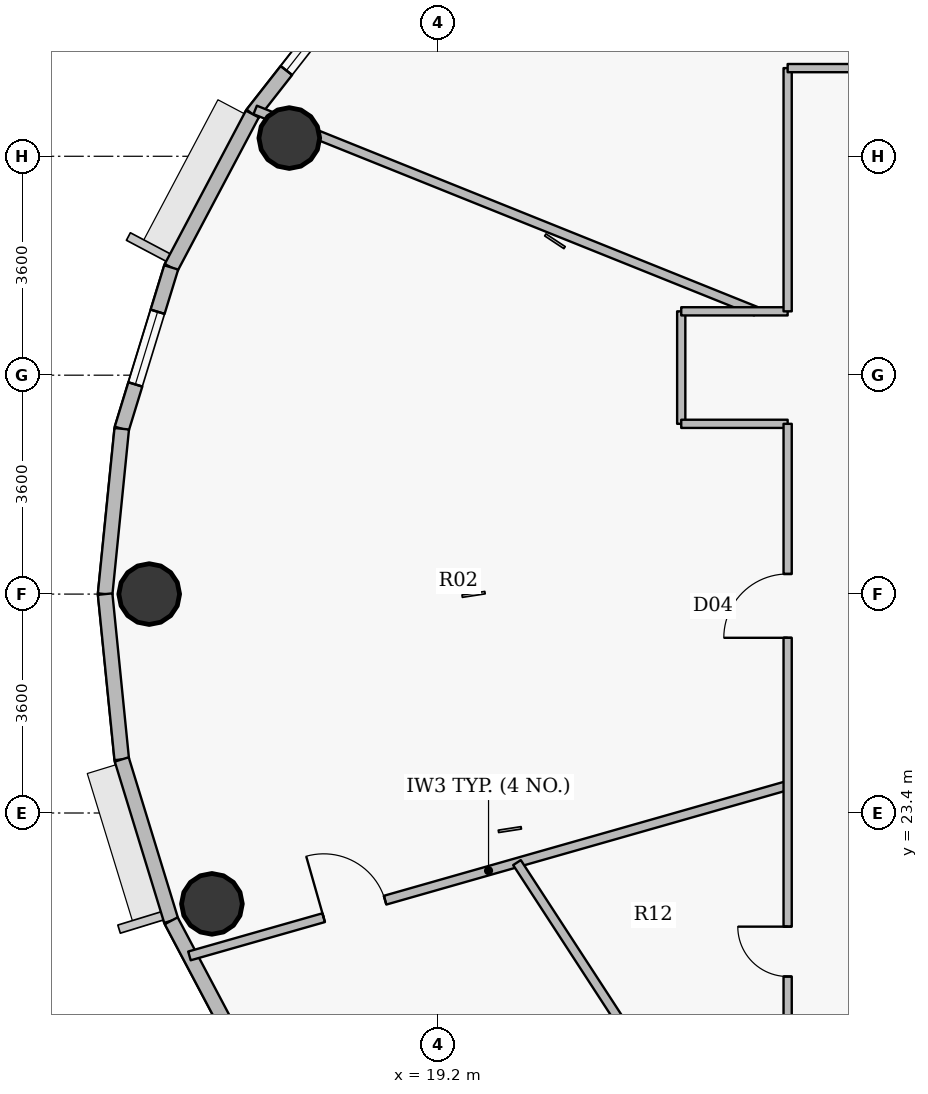
"""IFC4 building model, lengths in metres.
Left out: names, types, materials, properties, quantities, classifications, styles, units other than length and angle.
Written with IfcOpenShell. Run it as: python <this file> out.ifc"""

import sys

from ifc_helpers import new_model, si_unit, direction, frame, frame_2d, origin, origin_2d, place, context, subcontext, project, spatial, rectangle, hollow_circle, extrude, source, transform, mapped, element, fill, save


model = new_model("IFC4")
c1 = context("Model", 3, precision=1e-05, world=origin(), true_north=direction((0.0, 1.0)))
c2 = subcontext(c1, "Body", "Model", "MODEL_VIEW")
j1 = project(units=[si_unit("LENGTHUNIT", "METRE"), si_unit("PLANEANGLEUNIT", "RADIAN")], contexts=[c1])
p1 = place(None, origin())
s1 = spatial("IfcSite", under=j1, at=p1, CompositionType="ELEMENT")
p2 = place(p1, origin())
s2 = spatial("IfcBuilding", under=s1, at=p2, CompositionType="ELEMENT")
p3 = place(p2, frame((0.0, 0.0, 310.5)))
s3 = spatial("IfcBuildingStorey", under=s2, at=p3, CompositionType="ELEMENT", Elevation=310.5)
for number, where, z_axis, x_axis in (
    (1, (16.754, 34.5, 0.0), (0.0, 0.0, 1.0), (1.0, 0.0, 0.0)),
    (2, (14.45, 27.0, 0.0), (0.0, 0.0, 1.0), (1.0, 0.0, 0.0)),
    (3, (15.481, 21.906, 0.0), (0.0, 0.0, 1.0), (1.0, 0.0, 0.0)),
):
    element("IfcColumn", number, at=place(p3, frame(where, z_axis=z_axis, x_axis=x_axis)), inside=s3, PredefinedType="COLUMN", context=c2, shape_type="SweptSolid", body=[
        extrude(hollow_circle(Radius=0.5, WallThickness=0.032, at=origin_2d()), origin(), (0.0, 0.0, 1.0), 3.75),
    ])
p4 = place(p3, frame((16.146, 34.895, 0.0), z_axis=(0.0, 0.0, 1.0), x_axis=(0.616337186556, 0.787482363275, 0.0)))
e4 = element("IfcWall", 4, at=p4, inside=s3, PredefinedType="SOLIDWALL", context=c2, shape_type="SweptSolid", body=[
    extrude(rectangle(XDim=2.958, YDim=0.24, at=frame_2d((1.479, 0.0))), origin(), (0.0, 0.0, 1.0), 3.5),
])
p5 = place(p4, frame((0.909, 0.0, 0.9)))
e5 = element("IfcOpeningElement", 5, at=p5, cuts=e4, PredefinedType="OPENING", context=c2, shape_type="SweptSolid", body=[
    extrude(rectangle(XDim=1.25, YDim=1.65, at=origin_2d()), frame((0.625, 0.13, 0.825), z_axis=(0.0, -1.0, 0.0), x_axis=(1.0, 0.0, 0.0)), (0.0, 0.0, 1.0), 0.26),
])
p6 = place(p3, frame((14.812, 32.372, 0.0), z_axis=(0.0, 0.0, 1.0), x_axis=(0.467628269026, 0.883925224218, 0.0)))
e6 = element("IfcWall", 6, at=p6, inside=s3, PredefinedType="SOLIDWALL", context=c2, shape_type="SweptSolid", body=[
    extrude(rectangle(XDim=2.854, YDim=0.24, at=frame_2d((1.427, 0.0))), origin(), (0.0, 0.0, 1.0), 3.5),
])
p7 = place(p3, frame((13.998, 29.719, 0.0), z_axis=(0.0, 0.0, 1.0), x_axis=(0.2931213403, 0.956075248012, 0.0)))
e7 = element("IfcWall", 7, at=p7, inside=s3, PredefinedType="SOLIDWALL", context=c2, shape_type="SweptSolid", body=[
    extrude(rectangle(XDim=2.775, YDim=0.24, at=frame_2d((1.388, 0.0))), origin(), (0.0, 0.0, 1.0), 3.5),
])
p8 = place(p7, frame((0.763, 0.0, 0.9)))
e8 = element("IfcOpeningElement", 8, at=p8, cuts=e7, PredefinedType="OPENING", context=c2, shape_type="SweptSolid", body=[
    extrude(rectangle(XDim=1.25, YDim=1.65, at=origin_2d()), frame((0.625, 0.13, 0.825), z_axis=(0.0, -1.0, 0.0), x_axis=(1.0, 0.0, 0.0)), (0.0, 0.0, 1.0), 0.26),
])
for number, where, z_axis, x_axis in (
    (9, (13.725, 27.0, 0.0), (0.0, 0.0, 1.0), (0.1, 0.995, 0.0)),
    (10, (13.998, 24.281, 0.0), (0.0, 0.0, 1.0), (-0.1, 0.995, 0.0)),
):
    element("IfcWall", number, at=place(p3, frame(where, z_axis=z_axis, x_axis=x_axis)), inside=s3, PredefinedType="SOLIDWALL", context=c2, shape_type="SweptSolid", body=[
        extrude(rectangle(XDim=2.733, YDim=0.24, at=frame_2d((1.366, 0.0))), origin(), (0.0, 0.0, 1.0), 3.5),
    ])
p9 = place(p3, frame((14.812, 21.628, 0.0), z_axis=(0.0, 0.0, 1.0), x_axis=(-0.2931213403, 0.956075248012, 0.0)))
e11 = element("IfcWall", 11, at=p9, inside=s3, PredefinedType="SOLIDWALL", context=c2, shape_type="SweptSolid", body=[
    extrude(rectangle(XDim=2.775, YDim=0.24, at=frame_2d((1.388, 0.0))), origin(), (0.0, 0.0, 1.0), 3.5),
])
p10 = place(p3, frame((16.146, 19.105, 0.0), z_axis=(0.0, 0.0, 1.0), x_axis=(-0.467628269026, 0.883925224218, 0.0)))
e12 = element("IfcWall", 12, at=p10, inside=s3, PredefinedType="SOLIDWALL", context=c2, shape_type="SweptSolid", body=[
    extrude(rectangle(XDim=2.854, YDim=0.24, at=frame_2d((1.427, 0.0))), origin(), (0.0, 0.0, 1.0), 3.5),
])
p11 = place(p3, frame((15.112, 21.05, 0.0), z_axis=(0.0, 0.0, 1.0), x_axis=(0.961740695875, 0.273961373004, 0.0)))
e13 = element("IfcWall", 13, at=p11, inside=s3, PredefinedType="PARTITIONING", context=c2, shape_type="SweptSolid", body=[
    extrude(rectangle(XDim=10.229, YDim=0.15, at=frame_2d((5.115, 0.0))), origin(), (0.0, 0.0, 1.0), 2.985),
])
p12 = place(p11, frame((2.295, 0.0, 0.0)))
e14 = element("IfcOpeningElement", 14, at=p12, cuts=e13, PredefinedType="OPENING", context=c2, shape_type="SweptSolid", body=[
    extrude(rectangle(XDim=1.05, YDim=2.15, at=origin_2d()), frame((0.525, 0.085, 1.075), z_axis=(0.0, -1.0, 0.0), x_axis=(1.0, 0.0, 0.0)), (0.0, 0.0, 1.0), 0.17),
])
p13 = place(p3, frame((16.193, 34.962, 0.0), z_axis=(0.0, 0.0, 1.0), x_axis=(0.927839710722, -0.372979183343, 0.0)))
e15 = element("IfcWall", 15, at=p13, inside=s3, PredefinedType="PARTITIONING", context=c2, shape_type="SweptSolid", body=[
    extrude(rectangle(XDim=8.874, YDim=0.15, at=frame_2d((4.437, 0.0))), origin(), (0.0, 0.0, 1.0), 3.035),
])
p14 = place(p3, frame((20.499, 22.584, 0.0), z_axis=(0.0, 0.0, 1.0), x_axis=(0.545422512832, -0.838161250892, 0.0)))
e16 = element("IfcWall", 16, at=p14, inside=s3, PredefinedType="PARTITIONING", context=c2, shape_type="SweptSolid", body=[
    extrude(rectangle(XDim=3.834, YDim=0.15, at=frame_2d((1.917, 0.0))), origin(), (0.0, 0.0, 1.0), 3.5),
])
p15 = place(p3, frame((23.2, 29.8, 0.0), z_axis=(0.0, 0.0, 1.0), x_axis=(0.0, 1.0, 0.0)))
e17 = element("IfcWall", 17, at=p15, inside=s3, PredefinedType="PARTITIONING", context=c2, shape_type="SweptSolid", body=[
    extrude(rectangle(XDim=1.85, YDim=0.135, at=frame_2d((0.925, 0.0))), origin(), (0.0, 0.0, 1.0), 3.5),
])
p16 = place(p3, frame((23.2, 29.8, 0.0), z_axis=(0.0, 0.0, 1.0), x_axis=(1.0, 0.0, 0.0)))
e18 = element("IfcWall", 18, at=p16, inside=s3, PredefinedType="PARTITIONING", context=c2, shape_type="SweptSolid", body=[
    extrude(rectangle(XDim=1.75, YDim=0.135, at=frame_2d((0.875, 0.0))), origin(), (0.0, 0.0, 1.0), 3.5),
])
p17 = place(p3, frame((23.2, 31.65, 0.0), z_axis=(0.0, 0.0, 1.0), x_axis=(1.0, 0.0, 0.0)))
e19 = element("IfcWall", 19, at=p17, inside=s3, PredefinedType="PARTITIONING", context=c2, shape_type="SweptSolid", body=[
    extrude(rectangle(XDim=1.75, YDim=0.135, at=frame_2d((0.875, 0.0))), origin(), (0.0, 0.0, 1.0), 3.035),
])
p18 = place(p3, frame((24.95, 18.35, 0.0), z_axis=(0.0, 0.0, 1.0), x_axis=(0.0, 1.0, 0.0)))
e20 = element("IfcWall", 20, at=p18, inside=s3, PredefinedType="PARTITIONING", context=c2, shape_type="SweptSolid", body=[
    extrude(rectangle(XDim=11.45, YDim=0.135, at=frame_2d((5.725, 0.0))), origin(), (0.0, 0.0, 1.0), 3.035),
])
p19 = place(p18, frame((7.931, 0.0, 0.0)))
e21 = element("IfcOpeningElement", 21, at=p19, cuts=e20, PredefinedType="OPENING", context=c2, shape_type="SweptSolid", body=[
    extrude(rectangle(XDim=1.05, YDim=2.15, at=origin_2d()), frame((0.525, 0.078, 1.075), z_axis=(0.0, -1.0, 0.0), x_axis=(1.0, 0.0, 0.0)), (0.0, 0.0, 1.0), 0.155),
])
p20 = place(p18, frame((2.361, 0.0, 0.0)))
e22 = element("IfcOpeningElement", 22, at=p20, cuts=e20, PredefinedType="OPENING", context=c2, shape_type="SweptSolid", body=[
    extrude(rectangle(XDim=0.82, YDim=2.1, at=origin_2d()), frame((0.41, 0.078, 1.05), z_axis=(0.0, -1.0, 0.0), x_axis=(1.0, 0.0, 0.0)), (0.0, 0.0, 1.0), 0.155),
])
p21 = place(p3, frame((24.95, 31.65, 0.0), z_axis=(0.0, 0.0, 1.0), x_axis=(0.0, 1.0, 0.0)))
e23 = element("IfcWall", 23, at=p21, inside=s3, PredefinedType="PARTITIONING", context=c2, shape_type="SweptSolid", body=[
    extrude(rectangle(XDim=4.0, YDim=0.135, at=frame_2d((2.0, 0.0))), origin(), (0.0, 0.0, 1.0), 3.035),
])
p22 = place(p3, frame((24.95, 35.65, 0.0), z_axis=(0.0, 0.0, 1.0), x_axis=(1.0, 0.0, 0.0)))
e24 = element("IfcWall", 24, at=p22, inside=s3, PredefinedType="PARTITIONING", context=c2, shape_type="SweptSolid", body=[
    extrude(rectangle(XDim=10.1, YDim=0.135, at=frame_2d((5.05, 0.0))), origin(), (0.0, 0.0, 1.0), 3.035),
])
p23 = place(p22, frame((3.094, 0.0, 0.0)))
e25 = element("IfcOpeningElement", 25, at=p23, cuts=e24, PredefinedType="OPENING", context=c2, shape_type="SweptSolid", body=[
    extrude(rectangle(XDim=1.05, YDim=2.15, at=origin_2d()), frame((0.525, 0.078, 1.075), z_axis=(0.0, -1.0, 0.0), x_axis=(1.0, 0.0, 0.0)), (0.0, 0.0, 1.0), 0.155),
])
m1 = source(origin(), c2, "Body", "SweptSolid", [
    extrude(rectangle(XDim=1.25, YDim=1.65, at=origin_2d()), frame((0.625, 0.03, 0.825), z_axis=(0.0, -1.0, 0.0), x_axis=(1.0, 0.0, 0.0)), (0.0, 0.0, 1.0), 0.06),
])
p24 = place(p5, origin())
e26 = element("IfcWindow", 26, at=p24, inside=s3, PartitioningType="SINGLE_PANEL", PredefinedType="WINDOW", context=c2, shape_type="MappedRepresentation", body=[
    mapped(m1, transform((0.0, 0.0, 0.0), x_axis=(1.0, 0.0, 0.0), y_axis=(0.0, 1.0, 0.0), z_axis=(0.0, 0.0, 1.0), scale=1.0)),
])
fill(e5, e26)
p25 = place(p8, origin())
e27 = element("IfcWindow", 27, at=p25, inside=s3, PartitioningType="SINGLE_PANEL", PredefinedType="WINDOW", context=c2, shape_type="MappedRepresentation", body=[
    mapped(m1, transform((0.0, 0.0, 0.0), x_axis=(1.0, 0.0, 0.0), y_axis=(0.0, 1.0, 0.0), z_axis=(0.0, 0.0, 1.0), scale=1.0)),
])
fill(e8, e27)
m2 = source(origin(), c2, "Body", "SweptSolid", [
    extrude(rectangle(XDim=1.05, YDim=2.15, at=origin_2d()), frame((0.525, 0.025, 1.075), z_axis=(0.0, -1.0, 0.0), x_axis=(1.0, 0.0, 0.0)), (0.0, 0.0, 1.0), 0.05),
])
p26 = place(p19, origin())
e28 = element("IfcDoor", 28, at=p26, inside=s3, OperationType="SINGLE_SWING_LEFT", PredefinedType="DOOR", context=c2, shape_type="MappedRepresentation", body=[
    mapped(m2, transform((0.0, 0.0, 0.0), x_axis=(1.0, 0.0, 0.0), y_axis=(0.0, 1.0, 0.0), z_axis=(0.0, 0.0, 1.0), scale=1.0)),
])
fill(e21, e28)
m3 = source(origin(), c2, "Body", "SweptSolid", [
    extrude(rectangle(XDim=0.82, YDim=2.1, at=origin_2d()), frame((0.41, 0.025, 1.05), z_axis=(0.0, -1.0, 0.0), x_axis=(1.0, 0.0, 0.0)), (0.0, 0.0, 1.0), 0.05),
])
p27 = place(p20, origin())
e29 = element("IfcDoor", 29, at=p27, inside=s3, OperationType="SINGLE_SWING_RIGHT", PredefinedType="DOOR", context=c2, shape_type="MappedRepresentation", body=[
    mapped(m3, transform((0.0, 0.0, 0.0), x_axis=(1.0, 0.0, 0.0), y_axis=(0.0, 1.0, 0.0), z_axis=(0.0, 0.0, 1.0), scale=1.0)),
])
fill(e22, e29)
p28 = place(p12, origin())
e30 = element("IfcDoor", 30, at=p28, inside=s3, OperationType="SINGLE_SWING_LEFT", PredefinedType="DOOR", context=c2, shape_type="MappedRepresentation", body=[
    mapped(m2, transform((0.0, 0.0, 0.0), x_axis=(1.0, 0.0, 0.0), y_axis=(0.0, 1.0, 0.0), z_axis=(0.0, 0.0, 1.0), scale=1.0)),
])
fill(e14, e30)
save(model, sys.argv[1])
